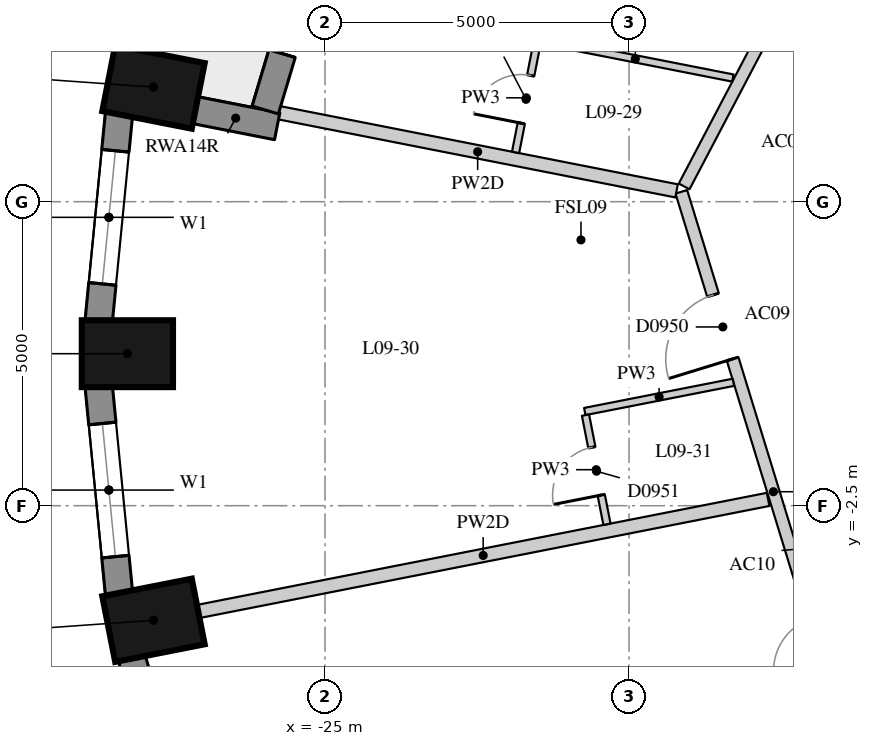
"""IFC4 building model, lengths in metres.
Left out: names, types, materials, properties, quantities, classifications, styles, units other than length and angle.
Written with IfcOpenShell. Run it as: python <this file> out.ifc"""

import sys

from ifc_helpers import new_model, si_unit, direction, frame, frame_2d, origin, origin_2d, place, context, subcontext, project, spatial, rectangle, extrude, element, fill, save


model = new_model("IFC4")
c1 = context("Model", 3, precision=1e-05, world=origin(), true_north=direction((0.0, 1.0)))
c2 = subcontext(c1, "Body", "Model", "MODEL_VIEW")
j1 = project(units=[si_unit("LENGTHUNIT", "METRE"), si_unit("PLANEANGLEUNIT", "RADIAN")], contexts=[c1])
p1 = place(None, origin())
s1 = spatial("IfcSite", under=j1, at=p1, CompositionType="ELEMENT")
p2 = place(p1, origin())
s2 = spatial("IfcBuilding", under=s1, at=p2, CompositionType="ELEMENT")
p3 = place(p2, frame((0.0, 0.0, 38.2)))
s3 = spatial("IfcBuildingStorey", under=s2, at=p3, CompositionType="ELEMENT", Elevation=38.2)
for number, where, z_axis, x_axis in (
    (1, (-27.821, 4.385, 0.0), (0.0, 0.0, 1.0), (-0.981, 0.193, 0.0)),
    (2, (-28.25, 0.0, 0.0), (0.0, 0.0, 1.0), (-1.0, 0.0, 0.0)),
    (3, (-27.821, -4.385, 0.0), (0.0, 0.0, 1.0), (-0.981, -0.193, 0.0)),
):
    element("IfcColumn", number, at=place(p3, frame(where, z_axis=z_axis, x_axis=x_axis)), inside=s3, PredefinedType="COLUMN", context=c2, shape_type="SweptSolid", body=[
        extrude(rectangle(XDim=1.5, YDim=1.1, at=origin_2d()), origin(), (0.0, 0.0, 1.0), 3.3),
    ])
p4 = place(p3, frame((-28.387, 3.956, 0.0), z_axis=(0.0, 0.0, 1.0), x_axis=(-0.097389581596, -0.995246336038, 0.0)))
e4 = element("IfcWall", 4, at=p4, inside=s3, PredefinedType="SOLIDWALL", context=c2, shape_type="SweptSolid", body=[
    extrude(rectangle(XDim=3.442, YDim=0.45, at=frame_2d((1.721, 0.0))), origin(), (0.0, 0.0, 1.0), 3.02),
])
p5 = place(p4, frame((0.621, 0.0, 0.4)))
e5 = element("IfcOpeningElement", 5, at=p5, cuts=e4, PredefinedType="OPENING", context=c2, shape_type="SweptSolid", body=[
    extrude(rectangle(XDim=2.2, YDim=1.75, at=frame_2d((1.1, 0.875))), frame((0.0, 0.235, 0.0), z_axis=(0.0, -1.0, 0.0), x_axis=(1.0, 0.0, 0.0)), (0.0, 0.0, 1.0), 0.47),
])
p6 = place(p3, frame((-28.722, -0.53, 0.0), z_axis=(0.0, 0.0, 1.0), x_axis=(0.097389581596, -0.995246336038, 0.0)))
e6 = element("IfcWall", 6, at=p6, inside=s3, PredefinedType="SOLIDWALL", context=c2, shape_type="SweptSolid", body=[
    extrude(rectangle(XDim=3.442, YDim=0.45, at=frame_2d((1.721, 0.0))), origin(), (0.0, 0.0, 1.0), 3.02),
])
p7 = place(p6, frame((0.621, 0.0, 0.4)))
e7 = element("IfcOpeningElement", 7, at=p7, cuts=e6, PredefinedType="OPENING", context=c2, shape_type="SweptSolid", body=[
    extrude(rectangle(XDim=2.2, YDim=1.75, at=frame_2d((1.1, 0.875))), frame((0.0, 0.235, 0.0), z_axis=(0.0, -1.0, 0.0), x_axis=(1.0, 0.0, 0.0)), (0.0, 0.0, 1.0), 0.47),
])
p8 = place(p3, frame((-28.182, -4.996, 0.0), z_axis=(0.0, 0.0, 1.0), x_axis=(0.287064133733, -0.957911364963, 0.0)))
e8 = element("IfcWall", 8, at=p8, inside=s3, PredefinedType="SOLIDWALL", context=c2, shape_type="SweptSolid", body=[
    extrude(rectangle(XDim=3.473, YDim=0.45, at=frame_2d((1.737, 0.0))), origin(), (0.0, 0.0, 1.0), 3.02),
])
p9 = place(p8, frame((0.637, 0.0, 0.4)))
e9 = element("IfcOpeningElement", 9, at=p9, cuts=e8, PredefinedType="OPENING", context=c2, shape_type="SweptSolid", body=[
    extrude(rectangle(XDim=2.2, YDim=1.75, at=frame_2d((1.1, 0.875))), frame((0.0, 0.235, 0.0), z_axis=(0.0, -1.0, 0.0), x_axis=(1.0, 0.0, 0.0)), (0.0, 0.0, 1.0), 0.47),
])
p10 = place(p3, frame((-27.151, 4.009, 0.0), z_axis=(0.0, 0.0, 1.0), x_axis=(0.981197182729, -0.1930080014, 0.0)))
e10 = element("IfcWall", 10, at=p10, inside=s3, PredefinedType="SOLIDWALL", context=c2, shape_type="SweptSolid", body=[
    extrude(rectangle(XDim=1.39, YDim=0.45, at=frame_2d((0.695, 0.0))), origin(), (0.0, 0.0, 1.0), 2.47),
])
p11 = place(p3, frame((-24.812, 7.925, 0.0), z_axis=(0.0, 0.0, 1.0), x_axis=(-0.286389028326, -0.95811341941, 0.0)))
e11 = element("IfcWall", 11, at=p11, inside=s3, PredefinedType="SOLIDWALL", context=c2, shape_type="SweptSolid", body=[
    extrude(rectangle(XDim=4.088, YDim=0.45, at=frame_2d((2.044, 0.0))), origin(), (0.0, 0.0, 1.0), 3.02),
])
p12 = place(p11, frame((0.969, 0.0, 0.4)))
e12 = element("IfcOpeningElement", 12, at=p12, cuts=e11, PredefinedType="OPENING", context=c2, shape_type="SweptSolid", body=[
    extrude(rectangle(XDim=1.0, YDim=1.75, at=frame_2d((0.5, 0.875))), frame((0.0, 0.235, 0.0), z_axis=(0.0, -1.0, 0.0), x_axis=(1.0, 0.0, 0.0)), (0.0, 0.0, 1.0), 0.47),
])
p13 = place(p11, frame((2.119, 0.0, 0.0)))
e13 = element("IfcOpeningElement", 13, at=p13, cuts=e11, PredefinedType="OPENING", context=c2, shape_type="SweptSolid", body=[
    extrude(rectangle(XDim=1.0, YDim=2.15, at=frame_2d((0.5, 1.075))), frame((0.0, 0.235, 0.0), z_axis=(0.0, -1.0, 0.0), x_axis=(1.0, 0.0, 0.0)), (0.0, 0.0, 1.0), 0.47),
])
p14 = place(p3, frame((-16.112, -7.203, 0.0), z_axis=(0.0, 0.0, 1.0), x_axis=(-0.293439067289, 0.95597777892, 0.0)))
e14 = element("IfcWall", 14, at=p14, inside=s3, PredefinedType="PARTITIONING", context=c2, shape_type="SweptSolid", body=[
    extrude(rectangle(XDim=10.319, YDim=0.2, at=frame_2d((5.16, 0.0))), origin(), (0.0, 0.0, 1.0), 3.02),
])
p15 = place(p14, frame((7.444, 0.0, 0.0)))
e15 = element("IfcOpeningElement", 15, at=p15, cuts=e14, PredefinedType="OPENING", context=c2, shape_type="SweptSolid", body=[
    extrude(rectangle(XDim=1.1, YDim=2.1, at=frame_2d((0.55, 1.05))), frame((0.0, 0.11, 0.0), z_axis=(0.0, -1.0, 0.0), x_axis=(1.0, 0.0, 0.0)), (0.0, 0.0, 1.0), 0.22),
])
p16 = place(p14, frame((2.081, 0.0, 0.0)))
e16 = element("IfcOpeningElement", 16, at=p16, cuts=e14, PredefinedType="OPENING", context=c2, shape_type="SweptSolid", body=[
    extrude(rectangle(XDim=0.9, YDim=2.1, at=frame_2d((0.45, 1.05))), frame((0.0, 0.11, 0.0), z_axis=(0.0, -1.0, 0.0), x_axis=(1.0, 0.0, 0.0)), (0.0, 0.0, 1.0), 0.22),
])
p17 = place(p3, frame((-19.094, 2.751, 0.0), z_axis=(0.0, 0.0, 1.0), x_axis=(0.464994434802, 0.88531360297, 0.0)))
e17 = element("IfcWall", 17, at=p17, inside=s3, PredefinedType="PARTITIONING", context=c2, shape_type="SweptSolid", body=[
    extrude(rectangle(XDim=6.438, YDim=0.2, at=frame_2d((3.219, 0.0))), origin(), (0.0, 0.0, 1.0), 3.02),
])
p18 = place(p3, frame((-25.761, 3.964, 0.0), z_axis=(0.0, 0.0, 1.0), x_axis=(0.981216162043, -0.192911490963, 0.0)))
e18 = element("IfcWall", 18, at=p18, inside=s3, PredefinedType="PARTITIONING", context=c2, shape_type="SweptSolid", body=[
    extrude(rectangle(XDim=6.668, YDim=0.22, at=frame_2d((3.334, 0.0))), origin(), (0.0, 0.0, 1.0), 2.47),
])
p19 = place(p3, frame((-27.085, -4.24, 0.0), z_axis=(0.0, 0.0, 1.0), x_axis=(0.981199931552, 0.192994026651, 0.0)))
e19 = element("IfcWall", 19, at=p19, inside=s3, PredefinedType="PARTITIONING", context=c2, shape_type="SweptSolid", body=[
    extrude(rectangle(XDim=9.552, YDim=0.22, at=frame_2d((4.776, 0.0))), origin(), (0.0, 0.0, 1.0), 2.47),
])
p20 = place(p3, frame((-18.292, 4.534, 0.0), z_axis=(0.0, 0.0, 1.0), x_axis=(-0.981198627208, 0.193000657942, 0.0)))
e20 = element("IfcWall", 20, at=p20, inside=s3, PredefinedType="PARTITIONING", context=c2, shape_type="SweptSolid", body=[
    extrude(rectangle(XDim=3.271, YDim=0.12, at=frame_2d((1.636, 0.0))), origin(), (0.0, 0.0, 1.0), 3.02),
])
p21 = place(p3, frame((-18.283, -0.47, 0.0), z_axis=(0.0, 0.0, 1.0), x_axis=(-0.981208753495, -0.192949169643, 0.0)))
e21 = element("IfcWall", 21, at=p21, inside=s3, PredefinedType="PARTITIONING", context=c2, shape_type="SweptSolid", body=[
    extrude(rectangle(XDim=2.491, YDim=0.12, at=frame_2d((1.246, 0.0))), origin(), (0.0, 0.0, 1.0), 3.02),
])
p22 = place(p3, frame((-21.513, 5.106, 0.0), z_axis=(0.0, 0.0, 1.0), x_axis=(-0.19288291118, -0.981221780524, 0.0)))
e22 = element("IfcWall", 22, at=p22, inside=s3, PredefinedType="PARTITIONING", context=c2, shape_type="SweptSolid", body=[
    extrude(rectangle(XDim=1.83, YDim=0.12, at=frame_2d((0.915, 0.0))), origin(), (0.0, 0.0, 1.0), 3.02),
])
p23 = place(p22, frame((0.54, 0.0, 0.0)))
e23 = element("IfcOpeningElement", 23, at=p23, cuts=e22, PredefinedType="OPENING", context=c2, shape_type="SweptSolid", body=[
    extrude(rectangle(XDim=0.8, YDim=2.1, at=frame_2d((0.4, 1.05))), frame((0.0, 0.07, 0.0), z_axis=(0.0, -1.0, 0.0), x_axis=(1.0, 0.0, 0.0)), (0.0, 0.0, 1.0), 0.14),
])
p24 = place(p3, frame((-20.716, -1.01, 0.0), z_axis=(0.0, 0.0, 1.0), x_axis=(0.193036598643, -0.981191557029, 0.0)))
e24 = element("IfcWall", 24, at=p24, inside=s3, PredefinedType="PARTITIONING", context=c2, shape_type="SweptSolid", body=[
    extrude(rectangle(XDim=1.83, YDim=0.12, at=frame_2d((0.915, 0.0))), origin(), (0.0, 0.0, 1.0), 3.02),
])
p25 = place(p24, frame((0.54, 0.0, 0.0)))
e25 = element("IfcOpeningElement", 25, at=p25, cuts=e24, PredefinedType="OPENING", context=c2, shape_type="SweptSolid", body=[
    extrude(rectangle(XDim=0.8, YDim=2.1, at=frame_2d((0.4, 1.05))), frame((0.0, 0.07, 0.0), z_axis=(0.0, -1.0, 0.0), x_axis=(1.0, 0.0, 0.0)), (0.0, 0.0, 1.0), 0.14),
])
p26 = place(p5, origin())
e26 = element("IfcWindow", 26, at=p26, inside=s3, PartitioningType="SINGLE_PANEL", PredefinedType="WINDOW", context=c2, shape_type="SweptSolid", body=[
    extrude(rectangle(XDim=2.2, YDim=1.75, at=frame_2d((1.1, 0.875))), frame((0.0, 0.035, 0.0), z_axis=(0.0, -1.0, 0.0), x_axis=(1.0, 0.0, 0.0)), (0.0, 0.0, 1.0), 0.06),
])
fill(e5, e26)
p27 = place(p7, origin())
e27 = element("IfcWindow", 27, at=p27, inside=s3, PartitioningType="SINGLE_PANEL", PredefinedType="WINDOW", context=c2, shape_type="SweptSolid", body=[
    extrude(rectangle(XDim=2.2, YDim=1.75, at=frame_2d((1.1, 0.875))), frame((0.0, 0.035, 0.0), z_axis=(0.0, -1.0, 0.0), x_axis=(1.0, 0.0, 0.0)), (0.0, 0.0, 1.0), 0.06),
])
fill(e7, e27)
p28 = place(p13, frame((1.0, 0.0, 0.0), z_axis=(0.0, 0.0, 1.0), x_axis=(-1.0, 0.0, 0.0)))
e28 = element("IfcDoor", 28, at=p28, inside=s3, OperationType="SINGLE_SWING_LEFT", PredefinedType="DOOR", context=c2, shape_type="SweptSolid", body=[
    extrude(rectangle(XDim=1.0, YDim=2.15, at=frame_2d((0.5, 1.075))), frame((0.0, 0.075, 0.0), z_axis=(0.0, -1.0, 0.0), x_axis=(1.0, 0.0, 0.0)), (0.0, 0.0, 1.0), 0.05),
])
fill(e13, e28)
p29 = place(p23, origin())
e29 = element("IfcDoor", 29, at=p29, inside=s3, OperationType="SINGLE_SWING_LEFT", PredefinedType="DOOR", context=c2, shape_type="SweptSolid", body=[
    extrude(rectangle(XDim=0.8, YDim=2.1, at=frame_2d((0.4, 1.05))), frame((0.0, 0.025, 0.0), z_axis=(0.0, -1.0, 0.0), x_axis=(1.0, 0.0, 0.0)), (0.0, 0.0, 1.0), 0.05),
])
fill(e23, e29)
p30 = place(p15, origin())
e30 = element("IfcDoor", 30, at=p30, inside=s3, OperationType="SINGLE_SWING_LEFT", PredefinedType="DOOR", context=c2, shape_type="SweptSolid", body=[
    extrude(rectangle(XDim=1.1, YDim=2.1, at=frame_2d((0.55, 1.05))), frame((0.0, 0.025, 0.0), z_axis=(0.0, -1.0, 0.0), x_axis=(1.0, 0.0, 0.0)), (0.0, 0.0, 1.0), 0.05),
])
fill(e15, e30)
p31 = place(p25, origin())
e31 = element("IfcDoor", 31, at=p31, inside=s3, OperationType="SINGLE_SWING_LEFT", PredefinedType="DOOR", context=c2, shape_type="SweptSolid", body=[
    extrude(rectangle(XDim=0.8, YDim=2.1, at=frame_2d((0.4, 1.05))), frame((0.0, 0.025, 0.0), z_axis=(0.0, -1.0, 0.0), x_axis=(1.0, 0.0, 0.0)), (0.0, 0.0, 1.0), 0.05),
])
fill(e25, e31)
save(model, sys.argv[1])
